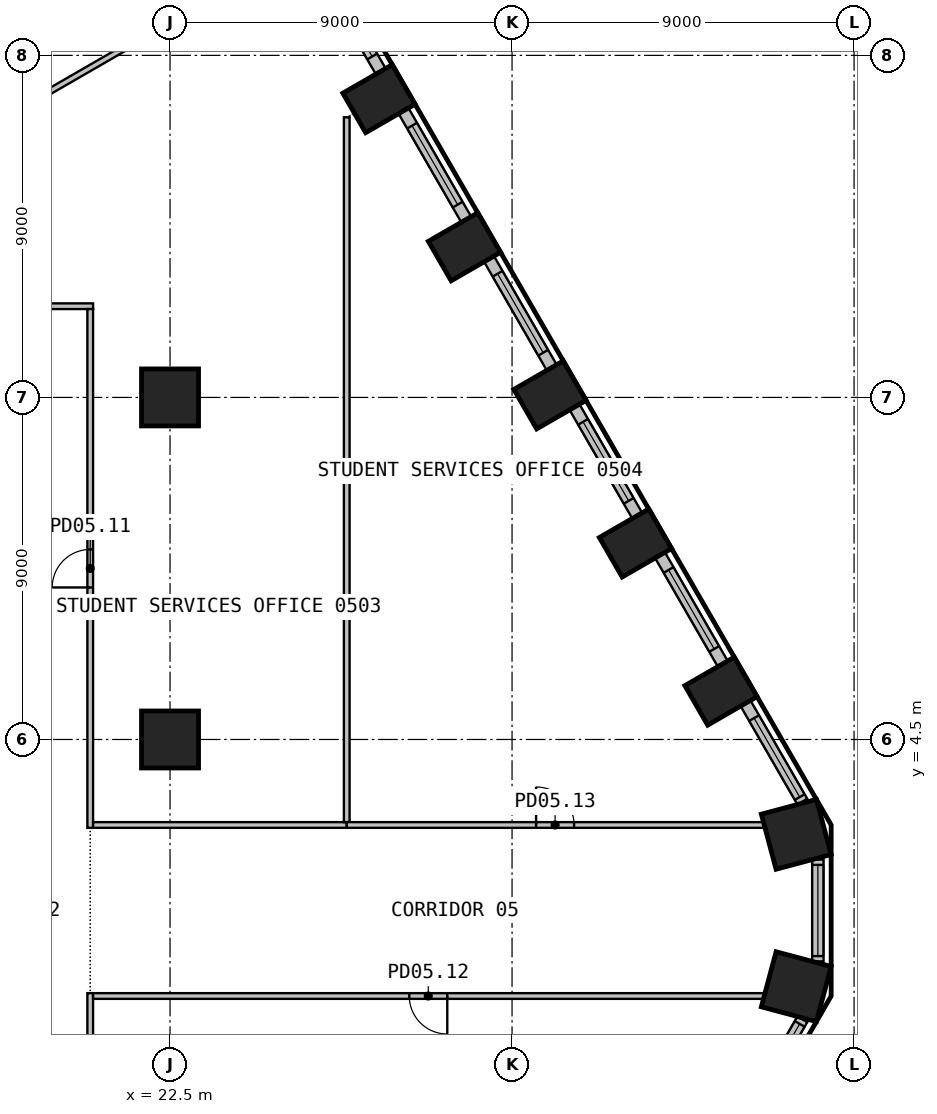
"""IFC4 building model, lengths in metres.
Left out: names, types, materials, properties, quantities, classifications, styles, units other than length and angle.
Written with IfcOpenShell. Run it as: python <this file> out.ifc"""

import sys

from ifc_helpers import new_model, si_unit, direction, frame, frame_2d, origin, origin_2d, place, context, subcontext, project, spatial, rectangle, circle, extrude, element, fill, save


model = new_model("IFC4")
c1 = context("Model", 3, precision=1e-05, world=origin(), true_north=direction((0.0, 1.0)))
c2 = subcontext(c1, "Body", "Model", "MODEL_VIEW")
j1 = project(units=[si_unit("LENGTHUNIT", "METRE"), si_unit("PLANEANGLEUNIT", "RADIAN")], contexts=[c1])
p1 = place(None, origin())
s1 = spatial("IfcSite", under=j1, at=p1, CompositionType="ELEMENT")
p2 = place(p1, origin())
s2 = spatial("IfcBuilding", under=s1, at=p2, CompositionType="ELEMENT")
p3 = place(p2, frame((0.0, 0.0, 25.2)))
s3 = spatial("IfcBuildingStorey", under=s2, at=p3, CompositionType="ELEMENT", Elevation=25.2)
for number, where, z_axis, x_axis in (
    (1, (38.979, -2.004, 0.0), (0.0, 0.0, 1.0), (0.259, 0.966, 0.0)),
    (2, (38.979, 2.004, 0.0), (0.0, 0.0, 1.0), (-0.259, 0.966, 0.0)),
):
    element("IfcColumn", number, at=place(p3, frame(where, z_axis=z_axis, x_axis=x_axis)), inside=s3, PredefinedType="COLUMN", context=c2, shape_type="SweptSolid", body=[
        extrude(rectangle(XDim=1.5, YDim=1.5, at=origin_2d()), origin(), (0.0, 0.0, 1.0), 4.425),
    ])
for number, where, z_axis, x_axis in (
    (3, (36.998, 5.772, 0.0), (0.0, 0.0, 1.0), (-0.5, 0.866, 0.0)),
    (4, (34.748, 9.669, 0.0), (0.0, 0.0, 1.0), (-0.5, 0.866, 0.0)),
    (5, (32.498, 13.566, 0.0), (0.0, 0.0, 1.0), (-0.5, 0.866, 0.0)),
    (6, (30.248, 17.463, 0.0), (0.0, 0.0, 1.0), (-0.5, 0.866, 0.0)),
    (7, (27.998, 21.361, 0.0), (0.0, 0.0, 1.0), (-0.5, 0.866, 0.0)),
):
    element("IfcColumn", number, at=place(p3, frame(where, z_axis=z_axis, x_axis=x_axis)), inside=s3, PredefinedType="COLUMN", context=c2, shape_type="SweptSolid", body=[
        extrude(rectangle(XDim=1.2, YDim=1.5, at=origin_2d()), origin(), (0.0, 0.0, 1.0), 4.425),
    ])
for number, where, z_axis, x_axis in (
    (8, (22.5, 4.5, 0.0), (0.0, 0.0, 1.0), (1.0, 0.0, 0.0)),
    (9, (22.5, 13.5, 0.0), (0.0, 0.0, 1.0), (1.0, 0.0, 0.0)),
):
    element("IfcColumn", number, at=place(p3, frame(where, z_axis=z_axis, x_axis=x_axis)), inside=s3, PredefinedType="COLUMN", context=c2, shape_type="SweptSolid", body=[
        extrude(circle(Radius=0.75, at=origin_2d()), origin(), (0.0, 0.0, 1.0), 4.425),
    ])
p4 = place(p3, frame((37.644, -5.452, 0.0), z_axis=(0.0, 0.0, 1.0), x_axis=(0.49999586137, 0.866027793211, 0.0)))
e10 = element("IfcWall", 10, at=p4, inside=s3, PredefinedType="SOLIDWALL", context=c2, shape_type="SweptSolid", body=[
    extrude(rectangle(XDim=2.989, YDim=0.3, at=frame_2d((1.494, 0.0))), origin(), (0.0, 0.0, 1.0), 4.425),
])
p5 = place(p4, frame((0.449, 0.0, 0.9)))
e11 = element("IfcOpeningElement", 11, at=p5, cuts=e10, PredefinedType="OPENING", context=c2, shape_type="SweptSolid", body=[
    extrude(rectangle(XDim=2.4, YDim=3.0, at=frame_2d((1.2, 1.5))), frame((0.0, 0.16, 0.0), z_axis=(0.0, -1.0, 0.0), x_axis=(1.0, 0.0, 0.0)), (0.0, 0.0, 1.0), 0.32),
])
p6 = place(p3, frame((39.547, -1.339, 0.0), z_axis=(0.0, 0.0, 1.0), x_axis=(0.0, 1.0, 0.0)))
e12 = element("IfcWall", 12, at=p6, inside=s3, PredefinedType="SOLIDWALL", context=c2, shape_type="SweptSolid", body=[
    extrude(rectangle(XDim=2.679, YDim=0.3, at=frame_2d((1.339, 0.0))), origin(), (0.0, 0.0, 1.0), 4.425),
])
p7 = place(p6, frame((0.139, 0.0, 0.9)))
e13 = element("IfcOpeningElement", 13, at=p7, cuts=e12, PredefinedType="OPENING", context=c2, shape_type="SweptSolid", body=[
    extrude(rectangle(XDim=2.4, YDim=3.0, at=frame_2d((1.2, 1.5))), frame((0.0, 0.16, 0.0), z_axis=(0.0, -1.0, 0.0), x_axis=(1.0, 0.0, 0.0)), (0.0, 0.0, 1.0), 0.32),
])
p8 = place(p3, frame((39.139, 2.864, 0.0), z_axis=(0.0, 0.0, 1.0), x_axis=(-0.49999586137, 0.866027793211, 0.0)))
e14 = element("IfcWall", 14, at=p8, inside=s3, PredefinedType="SOLIDWALL", context=c2, shape_type="SweptSolid", body=[
    extrude(rectangle(XDim=2.989, YDim=0.3, at=frame_2d((1.494, 0.0))), origin(), (0.0, 0.0, 1.0), 4.425),
])
p9 = place(p8, frame((0.139, 0.0, 0.9)))
e15 = element("IfcOpeningElement", 15, at=p9, cuts=e14, PredefinedType="OPENING", context=c2, shape_type="SweptSolid", body=[
    extrude(rectangle(XDim=2.4, YDim=3.0, at=frame_2d((1.2, 1.5))), frame((0.0, 0.16, 0.0), z_axis=(0.0, -1.0, 0.0), x_axis=(1.0, 0.0, 0.0)), (0.0, 0.0, 1.0), 0.32),
])
p10 = place(p3, frame((37.044, 6.492, 0.0), z_axis=(0.0, 0.0, 1.0), x_axis=(-0.499991515992, 0.866030301974, 0.0)))
e16 = element("IfcWall", 16, at=p10, inside=s3, PredefinedType="SOLIDWALL", context=c2, shape_type="SweptSolid", body=[
    extrude(rectangle(XDim=3.299, YDim=0.3, at=frame_2d((1.649, 0.0))), origin(), (0.0, 0.0, 1.0), 4.425),
])
p11 = place(p10, frame((0.449, 0.0, 0.9)))
e17 = element("IfcOpeningElement", 17, at=p11, cuts=e16, PredefinedType="OPENING", context=c2, shape_type="SweptSolid", body=[
    extrude(rectangle(XDim=2.4, YDim=3.0, at=frame_2d((1.2, 1.5))), frame((0.0, 0.16, 0.0), z_axis=(0.0, -1.0, 0.0), x_axis=(1.0, 0.0, 0.0)), (0.0, 0.0, 1.0), 0.32),
])
p12 = place(p3, frame((34.794, 10.389, 0.0), z_axis=(0.0, 0.0, 1.0), x_axis=(-0.499991515992, 0.866030301974, 0.0)))
e18 = element("IfcWall", 18, at=p12, inside=s3, PredefinedType="SOLIDWALL", context=c2, shape_type="SweptSolid", body=[
    extrude(rectangle(XDim=3.299, YDim=0.3, at=frame_2d((1.649, 0.0))), origin(), (0.0, 0.0, 1.0), 4.425),
])
p13 = place(p12, frame((0.449, 0.0, 0.9)))
e19 = element("IfcOpeningElement", 19, at=p13, cuts=e18, PredefinedType="OPENING", context=c2, shape_type="SweptSolid", body=[
    extrude(rectangle(XDim=2.4, YDim=3.0, at=frame_2d((1.2, 1.5))), frame((0.0, 0.16, 0.0), z_axis=(0.0, -1.0, 0.0), x_axis=(1.0, 0.0, 0.0)), (0.0, 0.0, 1.0), 0.32),
])
p14 = place(p3, frame((32.544, 14.286, 0.0), z_axis=(0.0, 0.0, 1.0), x_axis=(-0.499991515992, 0.866030301974, 0.0)))
e20 = element("IfcWall", 20, at=p14, inside=s3, PredefinedType="SOLIDWALL", context=c2, shape_type="SweptSolid", body=[
    extrude(rectangle(XDim=3.299, YDim=0.3, at=frame_2d((1.649, 0.0))), origin(), (0.0, 0.0, 1.0), 4.425),
])
p15 = place(p14, frame((0.449, 0.0, 0.9)))
e21 = element("IfcOpeningElement", 21, at=p15, cuts=e20, PredefinedType="OPENING", context=c2, shape_type="SweptSolid", body=[
    extrude(rectangle(XDim=2.4, YDim=3.0, at=frame_2d((1.2, 1.5))), frame((0.0, 0.16, 0.0), z_axis=(0.0, -1.0, 0.0), x_axis=(1.0, 0.0, 0.0)), (0.0, 0.0, 1.0), 0.32),
])
p16 = place(p3, frame((30.294, 18.184, 0.0), z_axis=(0.0, 0.0, 1.0), x_axis=(-0.499991515992, 0.866030301974, 0.0)))
e22 = element("IfcWall", 22, at=p16, inside=s3, PredefinedType="SOLIDWALL", context=c2, shape_type="SweptSolid", body=[
    extrude(rectangle(XDim=3.299, YDim=0.3, at=frame_2d((1.649, 0.0))), origin(), (0.0, 0.0, 1.0), 4.425),
])
p17 = place(p16, frame((0.449, 0.0, 0.9)))
e23 = element("IfcOpeningElement", 23, at=p17, cuts=e22, PredefinedType="OPENING", context=c2, shape_type="SweptSolid", body=[
    extrude(rectangle(XDim=2.4, YDim=3.0, at=frame_2d((1.2, 1.5))), frame((0.0, 0.16, 0.0), z_axis=(0.0, -1.0, 0.0), x_axis=(1.0, 0.0, 0.0)), (0.0, 0.0, 1.0), 0.32),
])
p18 = place(p3, frame((28.044, 22.081, 0.0), z_axis=(0.0, 0.0, 1.0), x_axis=(-0.499991515992, 0.866030301974, 0.0)))
e24 = element("IfcWall", 24, at=p18, inside=s3, PredefinedType="SOLIDWALL", context=c2, shape_type="SweptSolid", body=[
    extrude(rectangle(XDim=3.299, YDim=0.3, at=frame_2d((1.649, 0.0))), origin(), (0.0, 0.0, 1.0), 4.425),
])
p19 = place(p18, frame((0.449, 0.0, 0.9)))
e25 = element("IfcOpeningElement", 25, at=p19, cuts=e24, PredefinedType="OPENING", context=c2, shape_type="SweptSolid", body=[
    extrude(rectangle(XDim=2.4, YDim=3.0, at=frame_2d((1.2, 1.5))), frame((0.0, 0.16, 0.0), z_axis=(0.0, -1.0, 0.0), x_axis=(1.0, 0.0, 0.0)), (0.0, 0.0, 1.0), 0.32),
])
p20 = place(p3, frame((20.475, 15.9, 0.0), z_axis=(0.0, 0.0, 1.0), x_axis=(-1.0, 0.0, 0.0)))
e26 = element("IfcWall", 26, at=p20, inside=s3, PredefinedType="PARTITIONING", context=c2, shape_type="SweptSolid", body=[
    extrude(rectangle(XDim=10.66, YDim=0.15, at=frame_2d((5.33, 0.0))), origin(), (0.0, 0.0, 1.0), 4.425),
])
p21 = place(p3, frame((25.081, 24.873, 0.0), z_axis=(0.0, 0.0, 1.0), x_axis=(-0.866008122325, -0.500029931171, 0.0)))
e27 = element("IfcWall", 27, at=p21, inside=s3, PredefinedType="PARTITIONING", context=c2, shape_type="SweptSolid", body=[
    extrude(rectangle(XDim=17.87, YDim=0.15, at=frame_2d((8.935, 0.0))), origin(), (0.0, 0.0, 1.0), 4.425),
])
p22 = place(p3, frame((20.4, -15.825, 0.0), z_axis=(0.0, 0.0, 1.0), x_axis=(0.0, 1.0, 0.0)))
e28 = element("IfcWall", 28, at=p22, inside=s3, PredefinedType="PARTITIONING", context=c2, shape_type="SweptSolid", body=[
    extrude(rectangle(XDim=13.65, YDim=0.15, at=frame_2d((6.825, 0.0))), origin(), (0.0, 0.0, 1.0), 4.425),
])
p23 = place(p3, frame((38.115, -2.25, 0.0), z_axis=(0.0, 0.0, 1.0), x_axis=(-1.0, 0.0, 0.0)))
e29 = element("IfcWall", 29, at=p23, inside=s3, PredefinedType="PARTITIONING", context=c2, shape_type="SweptSolid", body=[
    extrude(rectangle(XDim=17.64, YDim=0.15, at=frame_2d((8.82, 0.0))), origin(), (0.0, 0.0, 1.0), 4.425),
])
p24 = place(p23, frame((8.32, 0.0, 0.0)))
e30 = element("IfcOpeningElement", 30, at=p24, cuts=e29, PredefinedType="OPENING", context=c2, shape_type="SweptSolid", body=[
    extrude(rectangle(XDim=1.0, YDim=2.1, at=frame_2d((0.5, 1.05))), frame((0.0, 0.085, 0.0), z_axis=(0.0, -1.0, 0.0), x_axis=(1.0, 0.0, 0.0)), (0.0, 0.0, 1.0), 0.17),
])
p25 = place(p3, frame((20.4, 2.175, 0.0), z_axis=(0.0, 0.0, 1.0), x_axis=(0.0, 1.0, 0.0)))
e31 = element("IfcWall", 31, at=p25, inside=s3, PredefinedType="PARTITIONING", context=c2, shape_type="SweptSolid", body=[
    extrude(rectangle(XDim=13.65, YDim=0.15, at=frame_2d((6.825, 0.0))), origin(), (0.0, 0.0, 1.0), 4.425),
])
p26 = place(p25, frame((6.325, 0.0, 0.0)))
e32 = element("IfcOpeningElement", 32, at=p26, cuts=e31, PredefinedType="OPENING", context=c2, shape_type="SweptSolid", body=[
    extrude(rectangle(XDim=1.0, YDim=2.1, at=frame_2d((0.5, 1.05))), frame((0.0, 0.085, 0.0), z_axis=(0.0, -1.0, 0.0), x_axis=(1.0, 0.0, 0.0)), (0.0, 0.0, 1.0), 0.17),
])
p27 = place(p3, frame((20.475, 2.25, 0.0), z_axis=(0.0, 0.0, 1.0), x_axis=(1.0, 0.0, 0.0)))
e33 = element("IfcWall", 33, at=p27, inside=s3, PredefinedType="PARTITIONING", context=c2, shape_type="SweptSolid", body=[
    extrude(rectangle(XDim=6.675, YDim=0.15, at=frame_2d((3.337, 0.0))), origin(), (0.0, 0.0, 1.0), 4.425),
])
p28 = place(p3, frame((27.15, 20.871, 0.0), z_axis=(0.0, 0.0, 1.0), x_axis=(0.0, -1.0, 0.0)))
e34 = element("IfcWall", 34, at=p28, inside=s3, PredefinedType="PARTITIONING", context=c2, shape_type="SweptSolid", body=[
    extrude(rectangle(XDim=18.546, YDim=0.15, at=frame_2d((9.273, 0.0))), origin(), (0.0, 0.0, 1.0), 4.425),
])
p29 = place(p3, frame((27.15, 2.25, 0.0), z_axis=(0.0, 0.0, 1.0), x_axis=(1.0, 0.0, 0.0)))
e35 = element("IfcWall", 35, at=p29, inside=s3, PredefinedType="PARTITIONING", context=c2, shape_type="SweptSolid", body=[
    extrude(rectangle(XDim=10.966, YDim=0.15, at=frame_2d((5.483, 0.0))), origin(), (0.0, 0.0, 1.0), 4.425),
])
p30 = place(p29, frame((4.983, 0.0, 0.0)))
e36 = element("IfcOpeningElement", 36, at=p30, cuts=e35, PredefinedType="OPENING", context=c2, shape_type="SweptSolid", body=[
    extrude(rectangle(XDim=1.0, YDim=2.1, at=frame_2d((0.5, 1.05))), frame((0.0, 0.085, 0.0), z_axis=(0.0, -1.0, 0.0), x_axis=(1.0, 0.0, 0.0)), (0.0, 0.0, 1.0), 0.17),
])
p31 = place(p5, origin())
e37 = element("IfcWindow", 37, at=p31, inside=s3, PartitioningType="SINGLE_PANEL", PredefinedType="WINDOW", context=c2, shape_type="SweptSolid", body=[
    extrude(rectangle(XDim=2.4, YDim=3.0, at=frame_2d((1.2, 1.5))), frame((0.0, 0.03, 0.0), z_axis=(0.0, -1.0, 0.0), x_axis=(1.0, 0.0, 0.0)), (0.0, 0.0, 1.0), 0.06),
])
fill(e11, e37)
p32 = place(p7, origin())
e38 = element("IfcWindow", 38, at=p32, inside=s3, PartitioningType="SINGLE_PANEL", PredefinedType="WINDOW", context=c2, shape_type="SweptSolid", body=[
    extrude(rectangle(XDim=2.4, YDim=3.0, at=frame_2d((1.2, 1.5))), frame((0.0, 0.03, 0.0), z_axis=(0.0, -1.0, 0.0), x_axis=(1.0, 0.0, 0.0)), (0.0, 0.0, 1.0), 0.06),
])
fill(e13, e38)
p33 = place(p9, origin())
e39 = element("IfcWindow", 39, at=p33, inside=s3, PartitioningType="SINGLE_PANEL", PredefinedType="WINDOW", context=c2, shape_type="SweptSolid", body=[
    extrude(rectangle(XDim=2.4, YDim=3.0, at=frame_2d((1.2, 1.5))), frame((0.0, 0.03, 0.0), z_axis=(0.0, -1.0, 0.0), x_axis=(1.0, 0.0, 0.0)), (0.0, 0.0, 1.0), 0.06),
])
fill(e15, e39)
p34 = place(p11, origin())
e40 = element("IfcWindow", 40, at=p34, inside=s3, PartitioningType="SINGLE_PANEL", PredefinedType="WINDOW", context=c2, shape_type="SweptSolid", body=[
    extrude(rectangle(XDim=2.4, YDim=3.0, at=frame_2d((1.2, 1.5))), frame((0.0, 0.03, 0.0), z_axis=(0.0, -1.0, 0.0), x_axis=(1.0, 0.0, 0.0)), (0.0, 0.0, 1.0), 0.06),
])
fill(e17, e40)
p35 = place(p13, origin())
e41 = element("IfcWindow", 41, at=p35, inside=s3, PartitioningType="SINGLE_PANEL", PredefinedType="WINDOW", context=c2, shape_type="SweptSolid", body=[
    extrude(rectangle(XDim=2.4, YDim=3.0, at=frame_2d((1.2, 1.5))), frame((0.0, 0.03, 0.0), z_axis=(0.0, -1.0, 0.0), x_axis=(1.0, 0.0, 0.0)), (0.0, 0.0, 1.0), 0.06),
])
fill(e19, e41)
p36 = place(p15, origin())
e42 = element("IfcWindow", 42, at=p36, inside=s3, PartitioningType="SINGLE_PANEL", PredefinedType="WINDOW", context=c2, shape_type="SweptSolid", body=[
    extrude(rectangle(XDim=2.4, YDim=3.0, at=frame_2d((1.2, 1.5))), frame((0.0, 0.03, 0.0), z_axis=(0.0, -1.0, 0.0), x_axis=(1.0, 0.0, 0.0)), (0.0, 0.0, 1.0), 0.06),
])
fill(e21, e42)
p37 = place(p17, origin())
e43 = element("IfcWindow", 43, at=p37, inside=s3, PartitioningType="SINGLE_PANEL", PredefinedType="WINDOW", context=c2, shape_type="SweptSolid", body=[
    extrude(rectangle(XDim=2.4, YDim=3.0, at=frame_2d((1.2, 1.5))), frame((0.0, 0.03, 0.0), z_axis=(0.0, -1.0, 0.0), x_axis=(1.0, 0.0, 0.0)), (0.0, 0.0, 1.0), 0.06),
])
fill(e23, e43)
p38 = place(p19, origin())
e44 = element("IfcWindow", 44, at=p38, inside=s3, PartitioningType="SINGLE_PANEL", PredefinedType="WINDOW", context=c2, shape_type="SweptSolid", body=[
    extrude(rectangle(XDim=2.4, YDim=3.0, at=frame_2d((1.2, 1.5))), frame((0.0, 0.03, 0.0), z_axis=(0.0, -1.0, 0.0), x_axis=(1.0, 0.0, 0.0)), (0.0, 0.0, 1.0), 0.06),
])
fill(e25, e44)
p39 = place(p26, origin())
e45 = element("IfcDoor", 45, at=p39, inside=s3, OperationType="SINGLE_SWING_LEFT", PredefinedType="DOOR", context=c2, shape_type="SweptSolid", body=[
    extrude(rectangle(XDim=1.0, YDim=2.1, at=frame_2d((0.5, 1.05))), frame((0.0, 0.025, 0.0), z_axis=(0.0, -1.0, 0.0), x_axis=(1.0, 0.0, 0.0)), (0.0, 0.0, 1.0), 0.05),
])
fill(e32, e45)
p40 = place(p24, origin())
e46 = element("IfcDoor", 46, at=p40, inside=s3, OperationType="SINGLE_SWING_RIGHT", PredefinedType="DOOR", context=c2, shape_type="SweptSolid", body=[
    extrude(rectangle(XDim=1.0, YDim=2.1, at=frame_2d((0.5, 1.05))), frame((0.0, 0.025, 0.0), z_axis=(0.0, -1.0, 0.0), x_axis=(1.0, 0.0, 0.0)), (0.0, 0.0, 1.0), 0.05),
])
fill(e30, e46)
p41 = place(p30, origin())
e47 = element("IfcDoor", 47, at=p41, inside=s3, OperationType="SINGLE_SWING_LEFT", PredefinedType="DOOR", context=c2, shape_type="SweptSolid", body=[
    extrude(rectangle(XDim=1.0, YDim=2.1, at=frame_2d((0.5, 1.05))), frame((0.0, 0.025, 0.0), z_axis=(0.0, -1.0, 0.0), x_axis=(1.0, 0.0, 0.0)), (0.0, 0.0, 1.0), 0.05),
])
fill(e36, e47)
save(model, sys.argv[1])
